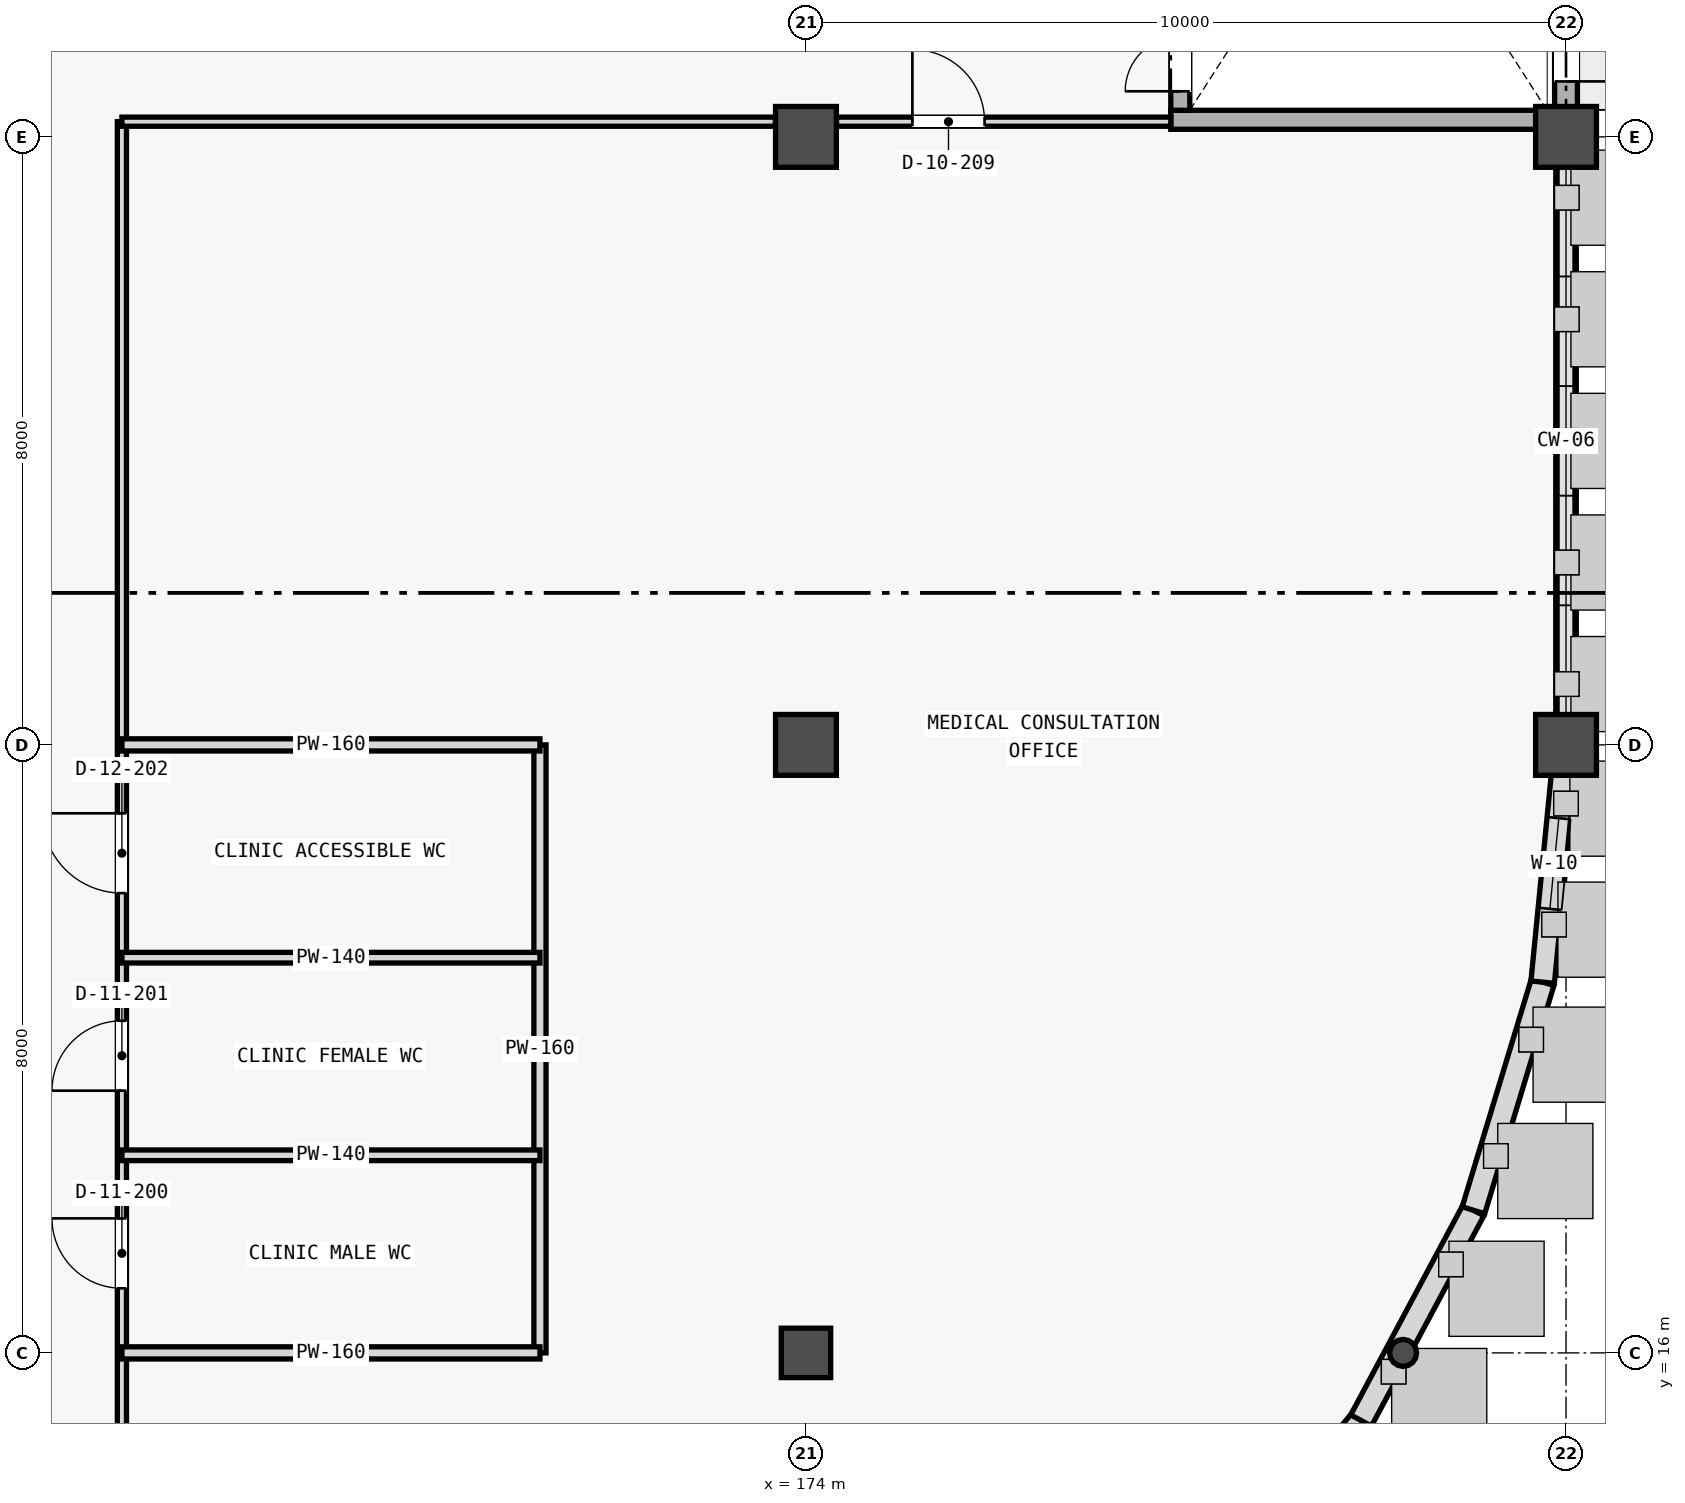
"""IFC4 building model, lengths in metres.
Left out: names, types, materials, properties, quantities, classifications, styles, units other than length and angle.
Written with IfcOpenShell. Run it as: python <this file> out.ifc"""

import sys

from ifc_helpers import new_model, si_unit, direction, frame, frame_2d, origin, origin_2d, place, context, subcontext, project, spatial, rectangle, hollow_circle, extrude, element, fill, save


model = new_model("IFC4")
c1 = context("Model", 3, precision=1e-05, world=origin(), true_north=direction((0.0, 1.0)))
c2 = subcontext(c1, "Body", "Model", "MODEL_VIEW")
j1 = project(units=[si_unit("LENGTHUNIT", "METRE"), si_unit("PLANEANGLEUNIT", "RADIAN")], contexts=[c1])
p1 = place(None, origin())
s1 = spatial("IfcSite", under=j1, at=p1, CompositionType="ELEMENT")
p2 = place(p1, origin())
s2 = spatial("IfcBuilding", under=s1, at=p2, CompositionType="ELEMENT")
p3 = place(p2, origin())
s3 = spatial("IfcBuildingStorey", under=s2, at=p3, CompositionType="ELEMENT", Elevation=0.0)
p4 = place(p3, frame((174.0, 16.0, 0.0), z_axis=(0.0, 0.0, 1.0), x_axis=(1.0, 0.0, 0.0)))
e1 = element("IfcColumn", 1, at=p4, inside=s3, PredefinedType="COLUMN", context=c2, shape_type="SweptSolid", body=[
    extrude(rectangle(XDim=0.65, YDim=0.65, at=origin_2d()), origin(), (0.0, 0.0, 1.0), 5.125),
])
for number, where, z_axis, x_axis in (
    (2, (174.0, 24.0, 0.0), (0.0, 0.0, 1.0), (1.0, 0.0, 0.0)),
    (3, (184.0, 24.0, 0.0), (0.0, 0.0, 1.0), (1.0, 0.0, 0.0)),
    (4, (174.0, 32.0, 0.0), (0.0, 0.0, 1.0), (1.0, 0.0, 0.0)),
    (5, (184.0, 32.0, 0.0), (0.0, 0.0, 1.0), (1.0, 0.0, 0.0)),
):
    element("IfcColumn", number, at=place(p3, frame(where, z_axis=z_axis, x_axis=x_axis)), inside=s3, PredefinedType="COLUMN", context=c2, shape_type="SweptSolid", body=[
        extrude(rectangle(XDim=0.8, YDim=0.8, at=origin_2d()), origin(), (0.0, 0.0, 1.0), 5.125),
    ])
p5 = place(p3, frame((181.856, 16.0, 0.0), z_axis=(0.0, 0.0, 1.0), x_axis=(1.0, 0.0, 0.0)))
e6 = element("IfcColumn", 6, at=p5, inside=s3, PredefinedType="COLUMN", context=c2, shape_type="SweptSolid", body=[
    extrude(hollow_circle(Radius=0.178, WallThickness=0.016, at=origin_2d()), origin(), (0.0, 0.0, 1.0), 5.125),
])
p6 = place(p3, frame((184.0, 24.396, 0.0), z_axis=(0.0, 0.0, 1.0), x_axis=(0.0, 1.0, 0.0)))
e7 = element("IfcWall", 7, at=p6, inside=s3, PredefinedType="STANDARD", context=c2, shape_type="SweptSolid", body=[
    extrude(rectangle(XDim=7.208, YDim=0.27, at=frame_2d((3.604, 0.0))), origin(), (0.0, 0.0, 1.0), 0.8),
])
p7 = place(p3, frame((184.0, 32.396, 0.0), z_axis=(0.0, 0.0, 1.0), x_axis=(0.0, 1.0, 0.0)))
e8 = element("IfcWall", 8, at=p7, inside=s3, PredefinedType="SHEAR", context=c2, shape_type="SweptSolid", body=[
    extrude(rectangle(XDim=7.208, YDim=0.3, at=frame_2d((3.604, 0.0))), origin(), (0.0, 0.0, 1.0), 5.4),
])
p8 = place(p7, frame((0.334, 0.0, 0.0)))
e9 = element("IfcOpeningElement", 9, at=p8, cuts=e8, PredefinedType="OPENING", context=c2, shape_type="SweptSolid", body=[
    extrude(rectangle(XDim=1.55, YDim=2.2, at=frame_2d((0.775, 1.1))), frame((0.0, 0.16, 0.0), z_axis=(0.0, -1.0, 0.0), x_axis=(1.0, 0.0, 0.0)), (0.0, 0.0, 1.0), 0.32),
])
p9 = place(p3, frame((179.314, 12.686, 0.0), z_axis=(0.0, 0.0, 1.0), x_axis=(0.634385792339, 0.773016601683, 0.0)))
e10 = element("IfcWall", 10, at=p9, inside=s3, PredefinedType="STANDARD", context=c2, shape_type="SweptSolid", body=[
    extrude(rectangle(XDim=3.136, YDim=0.31, at=frame_2d((1.568, 0.0))), origin(), (0.0, 0.0, 1.0), 4.9),
])
p10 = place(p9, frame((1.018, 0.0, 1.0)))
e11 = element("IfcOpeningElement", 11, at=p10, cuts=e10, PredefinedType="OPENING", context=c2, shape_type="SweptSolid", body=[
    extrude(rectangle(XDim=1.1, YDim=1.85, at=frame_2d((0.55, 0.925))), frame((0.0, 0.165, 0.0), z_axis=(0.0, -1.0, 0.0), x_axis=(1.0, 0.0, 0.0)), (0.0, 0.0, 1.0), 0.33),
])
p11 = place(p3, frame((181.303, 15.111, 0.0), z_axis=(0.0, 0.0, 1.0), x_axis=(0.471396060548, 0.881921625826, 0.0)))
e12 = element("IfcWall", 12, at=p11, inside=s3, PredefinedType="STANDARD", context=c2, shape_type="SweptSolid", body=[
    extrude(rectangle(XDim=3.136, YDim=0.31, at=frame_2d((1.568, 0.0))), origin(), (0.0, 0.0, 1.0), 4.705),
])
p12 = place(p3, frame((182.782, 17.877, 0.0), z_axis=(0.0, 0.0, 1.0), x_axis=(0.29030980253, 0.956932713703, 0.0)))
e13 = element("IfcWall", 13, at=p12, inside=s3, PredefinedType="STANDARD", context=c2, shape_type="SweptSolid", body=[
    extrude(rectangle(XDim=3.137, YDim=0.31, at=frame_2d((1.568, 0.0))), origin(), (0.0, 0.0, 1.0), 4.9),
])
p13 = place(p3, frame((183.693, 20.879, 0.0), z_axis=(0.0, 0.0, 1.0), x_axis=(0.098000751113, 0.995186340733, 0.0)))
e14 = element("IfcWall", 14, at=p13, inside=s3, PredefinedType="STANDARD", context=c2, shape_type="SweptSolid", body=[
    extrude(rectangle(XDim=3.136, YDim=0.31, at=frame_2d((1.568, 0.0))), origin(), (0.0, 0.0, 1.0), 4.255),
])
p14 = place(p13, frame((0.968, 0.0, 1.0)))
e15 = element("IfcOpeningElement", 15, at=p14, cuts=e14, PredefinedType="OPENING", context=c2, shape_type="SweptSolid", body=[
    extrude(rectangle(XDim=1.2, YDim=1.6, at=frame_2d((0.6, 0.8))), frame((0.0, 0.165, 0.0), z_axis=(0.0, -1.0, 0.0), x_axis=(1.0, 0.0, 0.0)), (0.0, 0.0, 1.0), 0.33),
])
p15 = place(p3, frame((178.8, 32.225, 0.0), z_axis=(0.0, 0.0, 1.0), x_axis=(1.0, 0.0, 0.0)))
e16 = element("IfcWall", 16, at=p15, inside=s3, PredefinedType="SHEAR", context=c2, shape_type="SweptSolid", body=[
    extrude(rectangle(XDim=5.2, YDim=0.25, at=frame_2d((2.6, 0.0))), origin(), (0.0, 0.0, 1.0), 5.4),
])
p16 = place(p3, frame((178.925, 32.35, 0.0), z_axis=(0.0, 0.0, 1.0), x_axis=(0.0, 1.0, 0.0)))
e17 = element("IfcWall", 17, at=p16, inside=s3, PredefinedType="SHEAR", context=c2, shape_type="SweptSolid", body=[
    extrude(rectangle(XDim=7.3, YDim=0.25, at=frame_2d((3.65, 0.0))), origin(), (0.0, 0.0, 1.0), 5.4),
])
p17 = place(p16, frame((0.25, 0.0, 0.0)))
e18 = element("IfcOpeningElement", 18, at=p17, cuts=e17, PredefinedType="OPENING", context=c2, shape_type="SweptSolid", body=[
    extrude(rectangle(XDim=1.45, YDim=2.2, at=frame_2d((0.725, 1.1))), frame((0.0, 0.135, 0.0), z_axis=(0.0, -1.0, 0.0), x_axis=(1.0, 0.0, 0.0)), (0.0, 0.0, 1.0), 0.27),
])
p18 = place(p3, frame((165.0, 8.15, 0.0), z_axis=(0.0, 0.0, 1.0), x_axis=(0.0, 1.0, 0.0)))
e19 = element("IfcWall", 19, at=p18, inside=s3, PredefinedType="PARTITIONING", context=c2, shape_type="SweptSolid", body=[
    extrude(rectangle(XDim=24.05, YDim=0.12, at=frame_2d((12.025, 0.0))), origin(), (0.0, 0.0, 1.0), 4.155),
])
p19 = place(p18, frame((8.7, 0.0, 0.0)))
e20 = element("IfcOpeningElement", 20, at=p19, cuts=e19, PredefinedType="OPENING", context=c2, shape_type="SweptSolid", body=[
    extrude(rectangle(XDim=0.92, YDim=2.1, at=frame_2d((0.46, 1.05))), frame((0.0, 0.07, 0.0), z_axis=(0.0, -1.0, 0.0), x_axis=(1.0, 0.0, 0.0)), (0.0, 0.0, 1.0), 0.14),
])
p20 = place(p18, frame((11.3, 0.0, 0.0)))
e21 = element("IfcOpeningElement", 21, at=p20, cuts=e19, PredefinedType="OPENING", context=c2, shape_type="SweptSolid", body=[
    extrude(rectangle(XDim=0.92, YDim=2.1, at=frame_2d((0.46, 1.05))), frame((0.0, 0.07, 0.0), z_axis=(0.0, -1.0, 0.0), x_axis=(1.0, 0.0, 0.0)), (0.0, 0.0, 1.0), 0.14),
])
p21 = place(p18, frame((13.9, 0.0, 0.0)))
e22 = element("IfcOpeningElement", 22, at=p21, cuts=e19, PredefinedType="OPENING", context=c2, shape_type="SweptSolid", body=[
    extrude(rectangle(XDim=1.05, YDim=2.15, at=frame_2d((0.525, 1.075))), frame((0.0, 0.07, 0.0), z_axis=(0.0, -1.0, 0.0), x_axis=(1.0, 0.0, 0.0)), (0.0, 0.0, 1.0), 0.14),
])
p22 = place(p3, frame((170.5, 16.0, 0.0), z_axis=(0.0, 0.0, 1.0), x_axis=(0.0, 1.0, 0.0)))
e23 = element("IfcWall", 23, at=p22, inside=s3, PredefinedType="PARTITIONING", context=c2, shape_type="SweptSolid", body=[
    extrude(rectangle(XDim=8.0, YDim=0.16, at=frame_2d((4.0, 0.0))), origin(), (0.0, 0.0, 1.0), 4.155),
])
p23 = place(p3, frame((165.0, 16.0, 0.0), z_axis=(0.0, 0.0, 1.0), x_axis=(1.0, 0.0, 0.0)))
e24 = element("IfcWall", 24, at=p23, inside=s3, PredefinedType="PARTITIONING", context=c2, shape_type="SweptSolid", body=[
    extrude(rectangle(XDim=5.5, YDim=0.16, at=frame_2d((2.75, 0.0))), origin(), (0.0, 0.0, 1.0), 4.305),
])
for number, where, z_axis, x_axis in (
    (25, (165.0, 18.6, 0.0), (0.0, 0.0, 1.0), (1.0, 0.0, 0.0)),
    (26, (165.0, 21.2, 0.0), (0.0, 0.0, 1.0), (1.0, 0.0, 0.0)),
):
    element("IfcWall", number, at=place(p3, frame(where, z_axis=z_axis, x_axis=x_axis)), inside=s3, PredefinedType="PLUMBINGWALL", context=c2, shape_type="SweptSolid", body=[
        extrude(rectangle(XDim=5.5, YDim=0.14, at=frame_2d((2.75, 0.0))), origin(), (0.0, 0.0, 1.0), 4.805),
    ])
p24 = place(p3, frame((165.0, 24.0, 0.0), z_axis=(0.0, 0.0, 1.0), x_axis=(1.0, 0.0, 0.0)))
e27 = element("IfcWall", 27, at=p24, inside=s3, PredefinedType="PARTITIONING", context=c2, shape_type="SweptSolid", body=[
    extrude(rectangle(XDim=5.5, YDim=0.16, at=frame_2d((2.75, 0.0))), origin(), (0.0, 0.0, 1.0), 4.155),
])
p25 = place(p3, frame((165.0, 32.2, 0.0), z_axis=(0.0, 0.0, 1.0), x_axis=(1.0, 0.0, 0.0)))
e28 = element("IfcWall", 28, at=p25, inside=s3, PredefinedType="PARTITIONING", context=c2, shape_type="SweptSolid", body=[
    extrude(rectangle(XDim=8.598, YDim=0.12, at=frame_2d((4.299, 0.0))), origin(), (0.0, 0.0, 1.0), 4.155),
])
p26 = place(p3, frame((174.402, 32.2, 0.0), z_axis=(0.0, 0.0, 1.0), x_axis=(1.0, 0.0, 0.0)))
e29 = element("IfcWall", 29, at=p26, inside=s3, PredefinedType="PARTITIONING", context=c2, shape_type="SweptSolid", body=[
    extrude(rectangle(XDim=4.398, YDim=0.12, at=frame_2d((2.199, 0.0))), origin(), (0.0, 0.0, 1.0), 4.255),
])
p27 = place(p26, frame((0.998, 0.0, 0.0)))
e30 = element("IfcOpeningElement", 30, at=p27, cuts=e29, PredefinedType="OPENING", context=c2, shape_type="SweptSolid", body=[
    extrude(rectangle(XDim=0.95, YDim=2.15, at=frame_2d((0.475, 1.075))), frame((0.0, 0.07, 0.0), z_axis=(0.0, -1.0, 0.0), x_axis=(1.0, 0.0, 0.0)), (0.0, 0.0, 1.0), 0.14),
])
p28 = place(p8, frame((1.55, 0.0, 0.0), z_axis=(0.0, 0.0, 1.0), x_axis=(-1.0, 0.0, 0.0)))
e31 = element("IfcDoor", 31, at=p28, inside=s3, OperationType="DOUBLE_DOOR_SINGLE_SWING", PredefinedType="DOOR", context=c2, shape_type="SweptSolid", body=[
    extrude(rectangle(XDim=1.55, YDim=2.2, at=frame_2d((0.775, 1.1))), frame((0.0, 0.025, 0.0), z_axis=(0.0, -1.0, 0.0), x_axis=(1.0, 0.0, 0.0)), (0.0, 0.0, 1.0), 0.05),
])
fill(e9, e31)
p29 = place(p14, origin())
e32 = element("IfcWindow", 32, at=p29, inside=s3, PartitioningType="SINGLE_PANEL", PredefinedType="WINDOW", context=c2, shape_type="SweptSolid", body=[
    extrude(rectangle(XDim=1.2, YDim=1.6, at=frame_2d((0.6, 0.8))), frame((0.0, 0.03, 0.0), z_axis=(0.0, -1.0, 0.0), x_axis=(1.0, 0.0, 0.0)), (0.0, 0.0, 1.0), 0.06),
])
fill(e15, e32)
p30 = place(p17, origin())
e33 = element("IfcDoor", 33, at=p30, inside=s3, OperationType="DOUBLE_DOOR_SINGLE_SWING", PredefinedType="DOOR", context=c2, shape_type="SweptSolid", body=[
    extrude(rectangle(XDim=1.45, YDim=2.2, at=frame_2d((0.725, 1.1))), frame((0.0, 0.025, 0.0), z_axis=(0.0, -1.0, 0.0), x_axis=(1.0, 0.0, 0.0)), (0.0, 0.0, 1.0), 0.05),
])
fill(e18, e33)
p31 = place(p19, origin())
e34 = element("IfcDoor", 34, at=p31, inside=s3, OperationType="SINGLE_SWING_RIGHT", PredefinedType="DOOR", context=c2, shape_type="SweptSolid", body=[
    extrude(rectangle(XDim=0.92, YDim=2.1, at=frame_2d((0.46, 1.05))), frame((0.0, 0.025, 0.0), z_axis=(0.0, -1.0, 0.0), x_axis=(1.0, 0.0, 0.0)), (0.0, 0.0, 1.0), 0.05),
])
fill(e20, e34)
p32 = place(p20, origin())
e35 = element("IfcDoor", 35, at=p32, inside=s3, OperationType="SINGLE_SWING_LEFT", PredefinedType="DOOR", context=c2, shape_type="SweptSolid", body=[
    extrude(rectangle(XDim=0.92, YDim=2.1, at=frame_2d((0.46, 1.05))), frame((0.0, 0.025, 0.0), z_axis=(0.0, -1.0, 0.0), x_axis=(1.0, 0.0, 0.0)), (0.0, 0.0, 1.0), 0.05),
])
fill(e21, e35)
p33 = place(p21, origin())
e36 = element("IfcDoor", 36, at=p33, inside=s3, OperationType="SINGLE_SWING_RIGHT", PredefinedType="DOOR", context=c2, shape_type="SweptSolid", body=[
    extrude(rectangle(XDim=1.05, YDim=2.15, at=frame_2d((0.525, 1.075))), frame((0.0, 0.025, 0.0), z_axis=(0.0, -1.0, 0.0), x_axis=(1.0, 0.0, 0.0)), (0.0, 0.0, 1.0), 0.05),
])
fill(e22, e36)
p34 = place(p27, origin())
e37 = element("IfcDoor", 37, at=p34, inside=s3, OperationType="SINGLE_SWING_LEFT", PredefinedType="DOOR", context=c2, shape_type="SweptSolid", body=[
    extrude(rectangle(XDim=0.95, YDim=2.15, at=frame_2d((0.475, 1.075))), frame((0.0, 0.025, 0.0), z_axis=(0.0, -1.0, 0.0), x_axis=(1.0, 0.0, 0.0)), (0.0, 0.0, 1.0), 0.05),
])
fill(e30, e37)
save(model, sys.argv[1])
